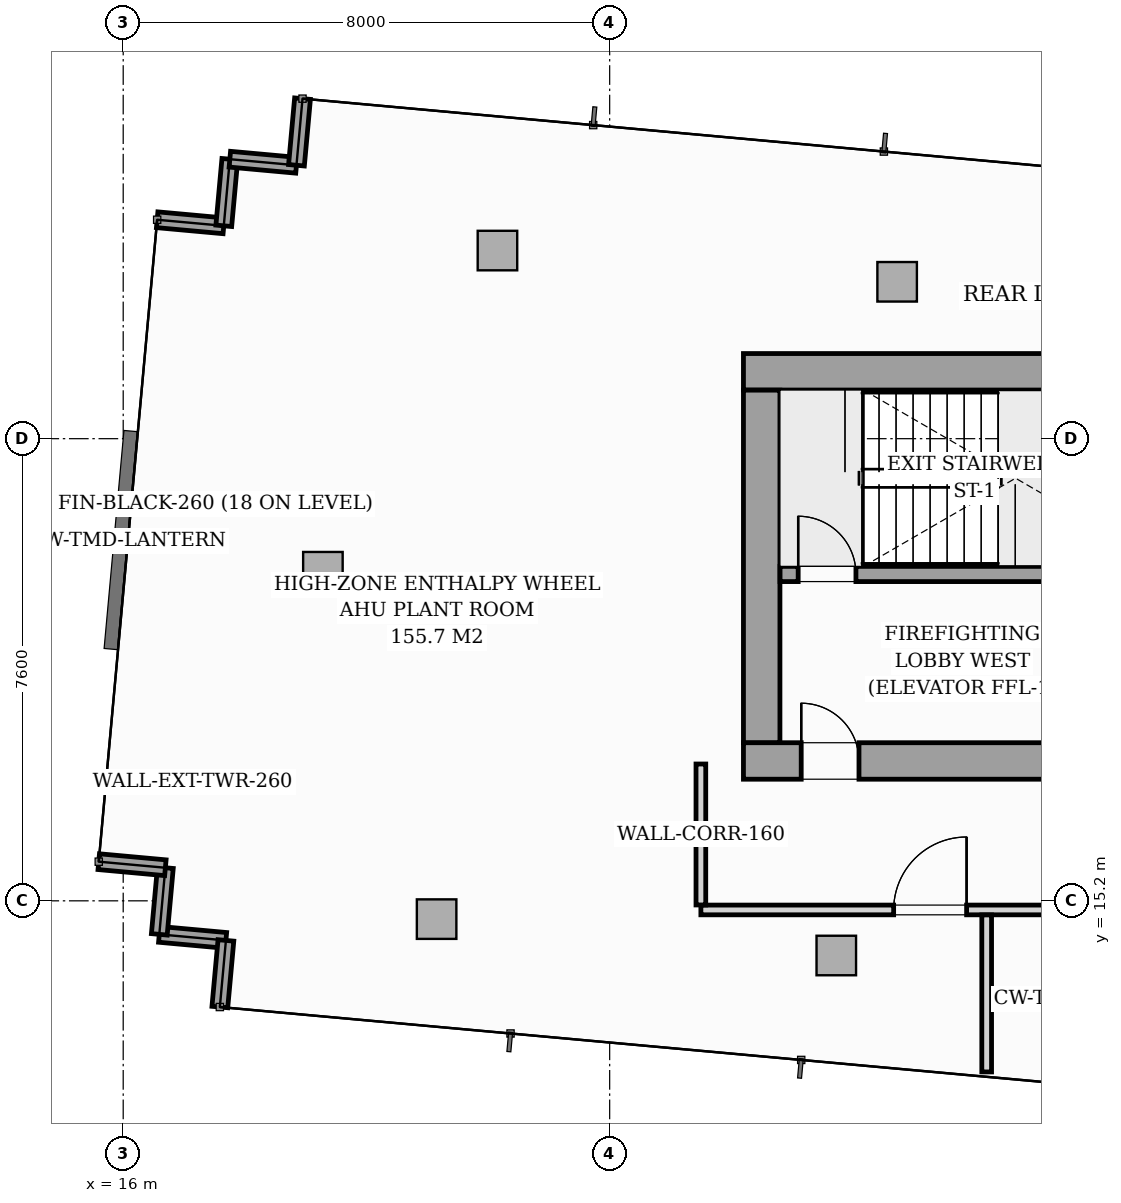
"""IFC4 building model, lengths in metres.
Left out: names, types, materials, properties, quantities, classifications, styles, units other than length and angle.
Written with IfcOpenShell. Run it as: python <this file> out.ifc"""

import sys

from ifc_helpers import new_model, si_unit, direction, frame, frame_2d, origin, origin_2d, place, context, subcontext, project, spatial, rectangle, i_section, extrude, source, transform, mapped, element, fill, save


model = new_model("IFC4")
c1 = context("Model", 3, precision=1e-05, world=origin(), true_north=direction((0.0, 1.0)))
c2 = subcontext(c1, "Body", "Model", "MODEL_VIEW")
j1 = project(units=[si_unit("LENGTHUNIT", "METRE"), si_unit("PLANEANGLEUNIT", "RADIAN")], contexts=[c1])
p1 = place(None, origin())
s1 = spatial("IfcSite", under=j1, at=p1, CompositionType="ELEMENT")
p2 = place(p1, origin())
s2 = spatial("IfcBuilding", under=s1, at=p2, CompositionType="ELEMENT")
p3 = place(p2, frame((0.0, 0.0, 283.8)))
s3 = spatial("IfcBuildingStorey", under=s2, at=p3, CompositionType="ELEMENT", Elevation=283.8)
m1 = source(origin(), c2, "Body", "SweptSolid", [
    extrude(i_section(OverallWidth=0.404, OverallDepth=0.407, WebThickness=0.027, FlangeThickness=0.044, FilletRadius=0.018, at=origin_2d()), origin(), (0.0, 0.0, 1.0), 6.496),
])
for number, where, z_axis, x_axis in (
    (1, (26.4, 17.4, 0.002), (0.0, 0.0, 1.0), (1.0, 0.0, 0.0)),
    (2, (26.4, 24.0, 0.002), (0.0, 0.0, 1.0), (1.0, 0.0, 0.0)),
):
    element("IfcColumn", number, at=place(p3, frame(where, z_axis=z_axis, x_axis=x_axis)), inside=s3, PredefinedType="PILASTER", context=c2, shape_type="MappedRepresentation", body=[
        mapped(m1, transform((0.0, 0.0, 0.0), scale=1.0)),
    ])
m2 = source(origin(), c2, "Body", "SweptSolid", [
    extrude(rectangle(XDim=0.65, YDim=0.65, at=origin_2d()), origin(), (0.0, 0.0, 1.0), 6.496),
])
for number, where, z_axis, x_axis in (
    (3, (21.154, 14.899, 0.002), (0.0, 0.0, 1.0), (0.996, -0.091, 0.0)),
    (4, (27.727, 14.301, 0.002), (0.0, 0.0, 1.0), (0.996, -0.091, 0.0)),
    (5, (22.155, 25.894, 0.002), (0.0, 0.0, 1.0), (0.996, -0.091, 0.0)),
    (6, (28.728, 25.38, 0.002), (0.0, 0.0, 1.0), (0.996, -0.091, 0.0)),
    (7, (19.284, 20.612, 0.002), (0.0, 0.0, 1.0), (0.996, -0.091, 0.0)),
):
    element("IfcColumn", number, at=place(p3, frame(where, z_axis=z_axis, x_axis=x_axis)), inside=s3, PredefinedType="COLUMN", context=c2, shape_type="MappedRepresentation", body=[
        mapped(m2, transform((0.0, 0.0, 0.0), scale=1.0)),
    ])
p4 = place(p3, frame((17.689, 14.549, 0.0), z_axis=(0.0, 0.0, 1.0), x_axis=(-0.995893206468, 0.090535746043, 0.0)))
e8 = element("IfcWall", 8, at=p4, inside=s3, PredefinedType="STANDARD", context=c2, shape_type="SweptSolid", body=[
    extrude(rectangle(XDim=1.1, YDim=0.26, at=frame_2d((0.55, 0.0))), origin(), (0.0, 0.0, 1.0), 6.22),
])
for number, where, z_axis, x_axis in (
    (9, (16.594, 14.649, 0.0), (0.0, 0.0, 1.0), (0.091, 0.996, 0.0)),
    (10, (16.693, 15.744, 0.0), (0.0, 0.0, 1.0), (-0.996, 0.091, 0.0)),
    (11, (16.559, 26.4, 0.0), (0.0, 0.0, 1.0), (0.996, -0.091, 0.0)),
    (12, (17.654, 26.301, 0.0), (0.0, 0.0, 1.0), (0.091, 0.996, 0.0)),
    (13, (17.754, 27.396, 0.0), (0.0, 0.0, 1.0), (0.996, -0.091, 0.0)),
    (14, (18.849, 27.296, 0.0), (0.0, 0.0, 1.0), (0.091, 0.996, 0.0)),
    (15, (17.589, 13.454, 0.0), (0.0, 0.0, 1.0), (0.091, 0.996, 0.0)),
):
    element("IfcWall", number, at=place(p3, frame(where, z_axis=z_axis, x_axis=x_axis)), inside=s3, PredefinedType="STANDARD", context=c2, shape_type="SweptSolid", body=[
        extrude(rectangle(XDim=1.1, YDim=0.26, at=frame_2d((0.55, 0.0))), origin(), (0.0, 0.0, 1.0), 6.22),
    ])
p5 = place(p3, frame((26.2, 17.5, 0.0), z_axis=(0.0, 0.0, 1.0), x_axis=(1.0, 0.0, 0.0)))
e16 = element("IfcWall", 16, at=p5, inside=s3, PredefinedType="SHEAR", context=c2, shape_type="SweptSolid", body=[
    extrude(rectangle(XDim=19.6, YDim=0.6, at=frame_2d((9.8, 0.0))), origin(), (0.0, 0.0, 1.0), 6.5),
])
p6 = place(p5, frame((0.95, 0.0, 0.0)))
e17 = element("IfcOpeningElement", 17, at=p6, cuts=e16, PredefinedType="OPENING", context=c2, shape_type="SweptSolid", body=[
    extrude(rectangle(XDim=0.95, YDim=2.06, at=frame_2d((0.475, 1.03))), frame((0.0, 0.31, 0.0), z_axis=(0.0, -1.0, 0.0), x_axis=(1.0, 0.0, 0.0)), (0.0, 0.0, 1.0), 0.62),
])
p7 = place(p5, frame((9.38, 0.0, 0.0)))
e18 = element("IfcOpeningElement", 18, at=p7, cuts=e16, PredefinedType="OPENING", context=c2, shape_type="SweptSolid", body=[
    extrude(rectangle(XDim=0.9, YDim=2.06, at=frame_2d((0.45, 1.03))), frame((0.0, 0.31, 0.0), z_axis=(0.0, -1.0, 0.0), x_axis=(1.0, 0.0, 0.0)), (0.0, 0.0, 1.0), 0.62),
])
p8 = place(p5, frame((17.55, 0.0, 0.0)))
e19 = element("IfcOpeningElement", 19, at=p8, cuts=e16, PredefinedType="OPENING", context=c2, shape_type="SweptSolid", body=[
    extrude(rectangle(XDim=0.95, YDim=2.06, at=frame_2d((0.475, 1.03))), frame((0.0, 0.31, 0.0), z_axis=(0.0, -1.0, 0.0), x_axis=(1.0, 0.0, 0.0)), (0.0, 0.0, 1.0), 0.62),
])
p9 = place(p3, frame((26.2, 23.9, 0.0), z_axis=(0.0, 0.0, 1.0), x_axis=(1.0, 0.0, 0.0)))
e20 = element("IfcWall", 20, at=p9, inside=s3, PredefinedType="SHEAR", context=c2, shape_type="SweptSolid", body=[
    extrude(rectangle(XDim=19.6, YDim=0.6, at=frame_2d((9.8, 0.0))), origin(), (0.0, 0.0, 1.0), 6.5),
])
p10 = place(p3, frame((26.5, 17.802, 0.0), z_axis=(0.0, 0.0, 1.0), x_axis=(0.0, 1.0, 0.0)))
e21 = element("IfcWall", 21, at=p10, inside=s3, PredefinedType="SHEAR", context=c2, shape_type="SweptSolid", body=[
    extrude(rectangle(XDim=5.796, YDim=0.6, at=frame_2d((2.898, 0.0))), origin(), (0.0, 0.0, 1.0), 6.5),
])
p11 = place(p3, frame((26.802, 20.575, 0.0), z_axis=(0.0, 0.0, 1.0), x_axis=(1.0, 0.0, 0.0)))
e22 = element("IfcWall", 22, at=p11, inside=s3, PredefinedType="SOLIDWALL", context=c2, shape_type="SweptSolid", body=[
    extrude(rectangle(XDim=8.148, YDim=0.25, at=frame_2d((4.074, 0.0))), origin(), (0.0, 0.0, 1.0), 6.5),
])
p12 = place(p11, frame((0.298, 0.0, 0.0)))
e23 = element("IfcOpeningElement", 23, at=p12, cuts=e22, PredefinedType="OPENING", context=c2, shape_type="SweptSolid", body=[
    extrude(rectangle(XDim=0.95, YDim=2.06, at=frame_2d((0.475, 1.03))), frame((0.0, 0.135, 0.0), z_axis=(0.0, -1.0, 0.0), x_axis=(1.0, 0.0, 0.0)), (0.0, 0.0, 1.0), 0.27),
])
p13 = place(p3, frame((25.5, 15.05, 0.0), z_axis=(0.0, 0.0, 1.0), x_axis=(1.0, 0.0, 0.0)))
e24 = element("IfcWall", 24, at=p13, inside=s3, PredefinedType="PARTITIONING", context=c2, shape_type="SweptSolid", body=[
    extrude(rectangle(XDim=21.0, YDim=0.16, at=frame_2d((10.5, 0.0))), origin(), (0.0, 0.0, 1.0), 5.948),
])
p14 = place(p13, frame((3.17, 0.0, 0.0)))
e25 = element("IfcOpeningElement", 25, at=p14, cuts=e24, PredefinedType="OPENING", context=c2, shape_type="SweptSolid", body=[
    extrude(rectangle(XDim=1.2, YDim=2.08, at=frame_2d((0.6, 1.04))), frame((0.0, 0.09, 0.0), z_axis=(0.0, -1.0, 0.0), x_axis=(1.0, 0.0, 0.0)), (0.0, 0.0, 1.0), 0.18),
])
p15 = place(p13, frame((6.7, 0.0, 0.0)))
e26 = element("IfcOpeningElement", 26, at=p15, cuts=e24, PredefinedType="OPENING", context=c2, shape_type="SweptSolid", body=[
    extrude(rectangle(XDim=1.2, YDim=2.08, at=frame_2d((0.6, 1.04))), frame((0.0, 0.09, 0.0), z_axis=(0.0, -1.0, 0.0), x_axis=(1.0, 0.0, 0.0)), (0.0, 0.0, 1.0), 0.18),
])
p16 = place(p13, frame((17.1, 0.0, 0.0)))
e27 = element("IfcOpeningElement", 27, at=p16, cuts=e24, PredefinedType="OPENING", context=c2, shape_type="SweptSolid", body=[
    extrude(rectangle(XDim=1.2, YDim=2.08, at=frame_2d((0.6, 1.04))), frame((0.0, 0.09, 0.0), z_axis=(0.0, -1.0, 0.0), x_axis=(1.0, 0.0, 0.0)), (0.0, 0.0, 1.0), 0.18),
])
p17 = place(p3, frame((25.5, 15.132, 0.0), z_axis=(0.0, 0.0, 1.0), x_axis=(0.0, 1.0, 0.0)))
e28 = element("IfcWall", 28, at=p17, inside=s3, PredefinedType="PARTITIONING", context=c2, shape_type="SweptSolid", body=[
    extrude(rectangle(XDim=2.318, YDim=0.16, at=frame_2d((1.159, 0.0))), origin(), (0.0, 0.0, 1.0), 6.22),
])
p18 = place(p3, frame((30.2, 12.386, 0.0), z_axis=(0.0, 0.0, 1.0), x_axis=(0.0, 1.0, 0.0)))
e29 = element("IfcWall", 29, at=p18, inside=s3, PredefinedType="PARTITIONING", context=c2, shape_type="SweptSolid", body=[
    extrude(rectangle(XDim=2.582, YDim=0.16, at=frame_2d((1.291, 0.0))), origin(), (0.0, 0.0, 1.0), 6.22),
])
m3 = source(origin(), c2, "Body", "SweptSolid", [
    extrude(rectangle(XDim=0.95, YDim=2.06, at=frame_2d((0.475, 1.03))), frame((0.0, 0.025, 0.0), z_axis=(0.0, -1.0, 0.0), x_axis=(1.0, 0.0, 0.0)), (0.0, 0.0, 1.0), 0.05),
])
p19 = place(p6, origin())
e30 = element("IfcDoor", 30, at=p19, inside=s3, OperationType="SINGLE_SWING_LEFT", PredefinedType="DOOR", context=c2, shape_type="MappedRepresentation", body=[
    mapped(m3, transform((0.0, 0.0, 0.0), scale=1.0)),
])
fill(e17, e30)
p20 = place(p12, origin())
e31 = element("IfcDoor", 31, at=p20, inside=s3, OperationType="SINGLE_SWING_LEFT", PredefinedType="DOOR", context=c2, shape_type="MappedRepresentation", body=[
    mapped(m3, transform((0.0, 0.0, 0.0), scale=1.0)),
])
fill(e23, e31)
m4 = source(origin(), c2, "Body", "SweptSolid", [
    extrude(rectangle(XDim=1.2, YDim=2.08, at=frame_2d((0.6, 1.04))), frame((0.0, 0.025, 0.0), z_axis=(0.0, -1.0, 0.0), x_axis=(1.0, 0.0, 0.0)), (0.0, 0.0, 1.0), 0.05),
])
p21 = place(p14, origin())
e32 = element("IfcDoor", 32, at=p21, inside=s3, OperationType="SINGLE_SWING_RIGHT", PredefinedType="DOOR", context=c2, shape_type="MappedRepresentation", body=[
    mapped(m4, transform((0.0, 0.0, 0.0), scale=1.0)),
])
fill(e25, e32)
save(model, sys.argv[1])
